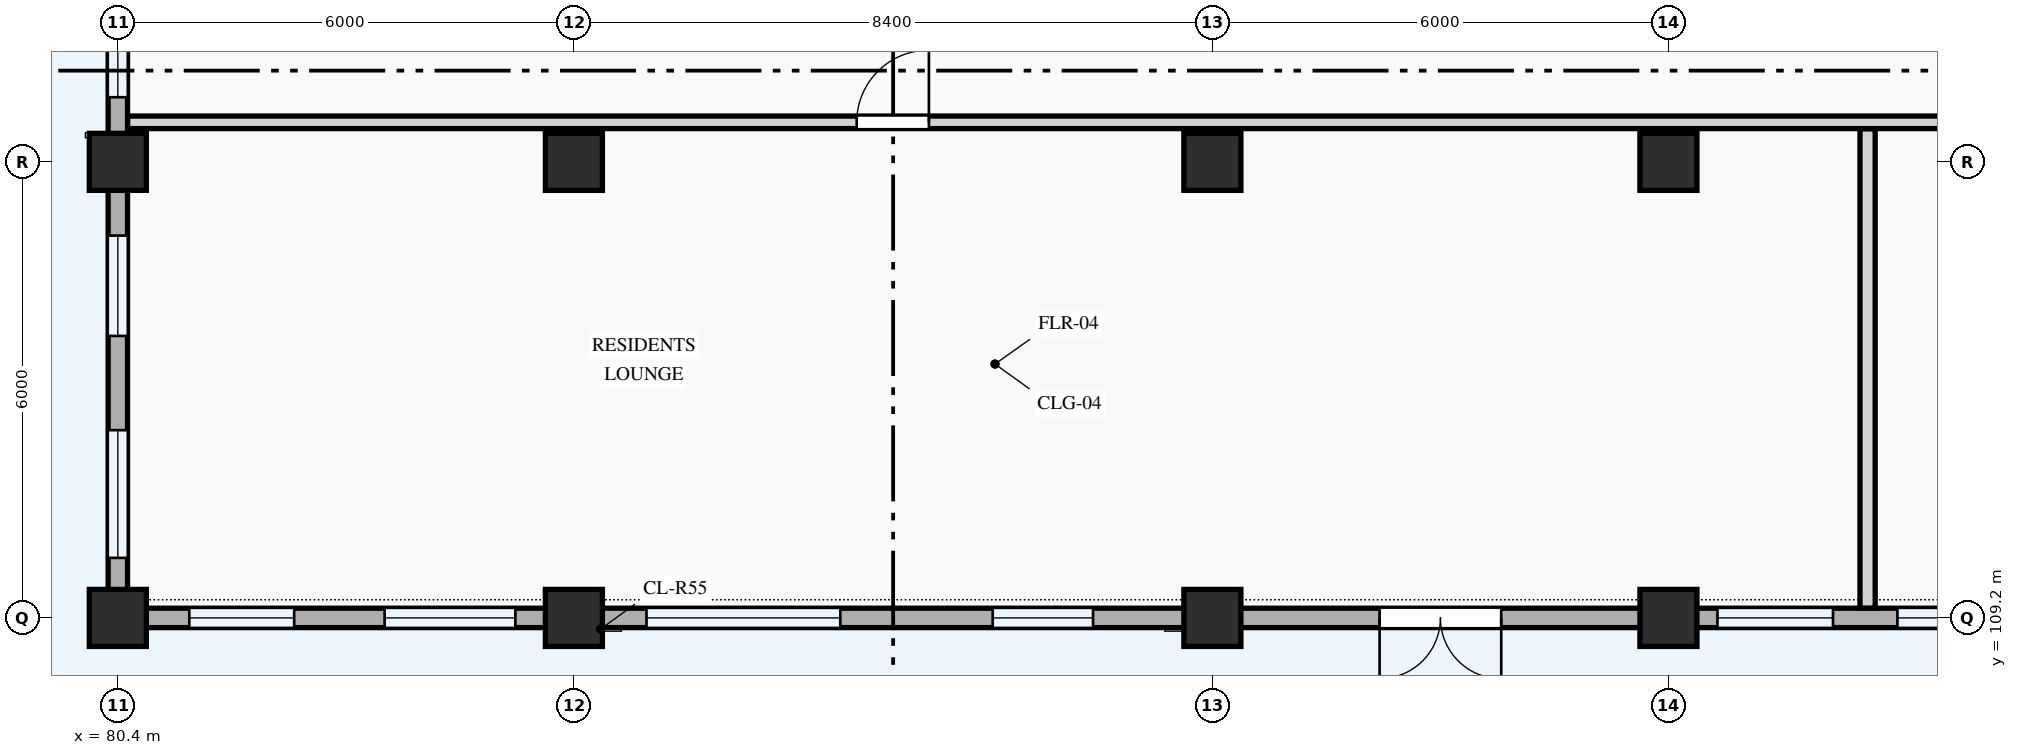
"""IFC4 building model, lengths in metres.
Left out: names, types, materials, properties, quantities, classifications, styles, units other than length and angle.
Written with IfcOpenShell. Run it as: python <this file> out.ifc"""

import sys

from ifc_helpers import new_model, si_unit, direction, frame, frame_2d, origin, origin_2d, place, context, subcontext, project, spatial, rectangle, extrude, element, fill, save


model = new_model("IFC4")
c1 = context("Model", 3, precision=1e-05, world=origin(), true_north=direction((0.0, 1.0)))
c2 = subcontext(c1, "Body", "Model", "MODEL_VIEW")
j1 = project(units=[si_unit("LENGTHUNIT", "METRE"), si_unit("PLANEANGLEUNIT", "RADIAN")], contexts=[c1])
p1 = place(None, origin())
s1 = spatial("IfcSite", under=j1, at=p1, CompositionType="ELEMENT")
p2 = place(p1, origin())
s2 = spatial("IfcBuilding", under=s1, at=p2, CompositionType="ELEMENT")
p3 = place(p2, origin())
s3 = spatial("IfcBuildingStorey", under=s2, at=p3, CompositionType="ELEMENT", Elevation=0.0)
for number, where, z_axis, x_axis in (
    (1, (80.4, 109.2, 0.0), (0.0, 0.0, 1.0), (1.0, 0.0, 0.0)),
    (2, (80.4, 115.2, 0.0), (0.0, 0.0, 1.0), (1.0, 0.0, 0.0)),
    (3, (86.4, 109.2, 0.0), (0.0, 0.0, 1.0), (1.0, 0.0, 0.0)),
    (4, (86.4, 115.2, 0.0), (0.0, 0.0, 1.0), (1.0, 0.0, 0.0)),
    (5, (94.8, 109.2, 0.0), (0.0, 0.0, 1.0), (1.0, 0.0, 0.0)),
    (6, (94.8, 115.2, 0.0), (0.0, 0.0, 1.0), (1.0, 0.0, 0.0)),
    (7, (100.8, 109.2, 0.0), (0.0, 0.0, 1.0), (1.0, 0.0, 0.0)),
    (8, (100.8, 115.2, 0.0), (0.0, 0.0, 1.0), (1.0, 0.0, 0.0)),
):
    element("IfcColumn", number, at=place(p3, frame(where, z_axis=z_axis, x_axis=x_axis)), inside=s3, PredefinedType="COLUMN", context=c2, shape_type="SweptSolid", body=[
        extrude(rectangle(XDim=0.75, YDim=0.75, at=origin_2d()), origin(), (0.0, 0.0, 1.0), 4.5),
    ])
p4 = place(p3, frame((80.4, 123.6, 0.0), z_axis=(0.0, 0.0, 1.0), x_axis=(0.0, -1.0, 0.0)))
e9 = element("IfcWall", 9, at=p4, inside=s3, PredefinedType="STANDARD", context=c2, shape_type="SweptSolid", body=[
    extrude(rectangle(XDim=8.4, YDim=0.255, at=frame_2d((4.2, 0.0))), origin(), (0.0, 0.0, 1.0), 3.485),
])
p5 = place(p4, frame((1.008, 0.0, 0.78)))
e10 = element("IfcOpeningElement", 10, at=p5, cuts=e9, PredefinedType="OPENING", context=c2, shape_type="SweptSolid", body=[
    extrude(rectangle(XDim=1.35, YDim=1.55, at=frame_2d((0.675, 0.775))), frame((0.0, 0.137, 0.0), z_axis=(0.0, -1.0, 0.0), x_axis=(1.0, 0.0, 0.0)), (0.0, 0.0, 1.0), 0.275),
])
p6 = place(p4, frame((3.728, 0.0, 0.78)))
e11 = element("IfcOpeningElement", 11, at=p6, cuts=e9, PredefinedType="OPENING", context=c2, shape_type="SweptSolid", body=[
    extrude(rectangle(XDim=1.6, YDim=1.75, at=frame_2d((0.8, 0.875))), frame((0.0, 0.137, 0.0), z_axis=(0.0, -1.0, 0.0), x_axis=(1.0, 0.0, 0.0)), (0.0, 0.0, 1.0), 0.275),
])
p7 = place(p4, frame((6.35, 0.0, 0.78)))
e12 = element("IfcOpeningElement", 12, at=p7, cuts=e9, PredefinedType="OPENING", context=c2, shape_type="SweptSolid", body=[
    extrude(rectangle(XDim=1.2, YDim=1.5, at=frame_2d((0.6, 0.75))), frame((0.0, 0.137, 0.0), z_axis=(0.0, -1.0, 0.0), x_axis=(1.0, 0.0, 0.0)), (0.0, 0.0, 1.0), 0.275),
])
p8 = place(p3, frame((80.4, 115.2, 0.0), z_axis=(0.0, 0.0, 1.0), x_axis=(0.0, -1.0, 0.0)))
e13 = element("IfcWall", 13, at=p8, inside=s3, PredefinedType="STANDARD", context=c2, shape_type="SweptSolid", body=[
    extrude(rectangle(XDim=6.0, YDim=0.255, at=frame_2d((3.0, 0.0))), origin(), (0.0, 0.0, 1.0), 3.585),
])
p9 = place(p8, frame((0.97, 0.0, 0.78)))
e14 = element("IfcOpeningElement", 14, at=p9, cuts=e13, PredefinedType="OPENING", context=c2, shape_type="SweptSolid", body=[
    extrude(rectangle(XDim=1.32, YDim=1.35, at=frame_2d((0.66, 0.675))), frame((0.0, 0.137, 0.0), z_axis=(0.0, -1.0, 0.0), x_axis=(1.0, 0.0, 0.0)), (0.0, 0.0, 1.0), 0.275),
])
p10 = place(p8, frame((3.53, 0.0, 0.78)))
e15 = element("IfcOpeningElement", 15, at=p10, cuts=e13, PredefinedType="OPENING", context=c2, shape_type="SweptSolid", body=[
    extrude(rectangle(XDim=1.68, YDim=1.46, at=frame_2d((0.84, 0.73))), frame((0.0, 0.137, 0.0), z_axis=(0.0, -1.0, 0.0), x_axis=(1.0, 0.0, 0.0)), (0.0, 0.0, 1.0), 0.275),
])
p11 = place(p3, frame((80.4, 109.2, 0.0), z_axis=(0.0, 0.0, 1.0), x_axis=(1.0, 0.0, 0.0)))
e16 = element("IfcWall", 16, at=p11, inside=s3, PredefinedType="STANDARD", context=c2, shape_type="SweptSolid", body=[
    extrude(rectangle(XDim=6.0, YDim=0.255, at=frame_2d((3.0, 0.0))), origin(), (0.0, 0.0, 1.0), 3.585),
])
p12 = place(p11, frame((0.94, 0.0, 0.78)))
e17 = element("IfcOpeningElement", 17, at=p12, cuts=e16, PredefinedType="OPENING", context=c2, shape_type="SweptSolid", body=[
    extrude(rectangle(XDim=1.38, YDim=1.48, at=frame_2d((0.69, 0.74))), frame((0.0, 0.137, 0.0), z_axis=(0.0, -1.0, 0.0), x_axis=(1.0, 0.0, 0.0)), (0.0, 0.0, 1.0), 0.275),
])
p13 = place(p11, frame((3.51, 0.0, 0.78)))
e18 = element("IfcOpeningElement", 18, at=p13, cuts=e16, PredefinedType="OPENING", context=c2, shape_type="SweptSolid", body=[
    extrude(rectangle(XDim=1.72, YDim=1.52, at=frame_2d((0.86, 0.76))), frame((0.0, 0.137, 0.0), z_axis=(0.0, -1.0, 0.0), x_axis=(1.0, 0.0, 0.0)), (0.0, 0.0, 1.0), 0.275),
])
p14 = place(p3, frame((86.4, 109.2, 0.0), z_axis=(0.0, 0.0, 1.0), x_axis=(1.0, 0.0, 0.0)))
e19 = element("IfcWall", 19, at=p14, inside=s3, PredefinedType="STANDARD", context=c2, shape_type="SweptSolid", body=[
    extrude(rectangle(XDim=8.4, YDim=0.255, at=frame_2d((4.2, 0.0))), origin(), (0.0, 0.0, 1.0), 3.485),
])
p15 = place(p14, frame((0.955, 0.0, 0.78)))
e20 = element("IfcOpeningElement", 20, at=p15, cuts=e19, PredefinedType="OPENING", context=c2, shape_type="SweptSolid", body=[
    extrude(rectangle(XDim=2.55, YDim=1.8, at=frame_2d((1.275, 0.9))), frame((0.0, 0.137, 0.0), z_axis=(0.0, -1.0, 0.0), x_axis=(1.0, 0.0, 0.0)), (0.0, 0.0, 1.0), 0.275),
])
p16 = place(p14, frame((5.51, 0.0, 0.78)))
e21 = element("IfcOpeningElement", 21, at=p16, cuts=e19, PredefinedType="OPENING", context=c2, shape_type="SweptSolid", body=[
    extrude(rectangle(XDim=1.32, YDim=1.35, at=frame_2d((0.66, 0.675))), frame((0.0, 0.137, 0.0), z_axis=(0.0, -1.0, 0.0), x_axis=(1.0, 0.0, 0.0)), (0.0, 0.0, 1.0), 0.275),
])
p17 = place(p3, frame((94.8, 109.2, 0.0), z_axis=(0.0, 0.0, 1.0), x_axis=(1.0, 0.0, 0.0)))
e22 = element("IfcWall", 22, at=p17, inside=s3, PredefinedType="STANDARD", context=c2, shape_type="SweptSolid", body=[
    extrude(rectangle(XDim=6.0, YDim=0.255, at=frame_2d((3.0, 0.0))), origin(), (0.0, 0.0, 1.0), 3.585),
])
p18 = place(p17, frame((2.2, 0.0, 0.0)))
e23 = element("IfcOpeningElement", 23, at=p18, cuts=e22, PredefinedType="OPENING", context=c2, shape_type="SweptSolid", body=[
    extrude(rectangle(XDim=1.6, YDim=2.35, at=frame_2d((0.8, 1.175))), frame((0.0, 0.137, 0.0), z_axis=(0.0, -1.0, 0.0), x_axis=(1.0, 0.0, 0.0)), (0.0, 0.0, 1.0), 0.275),
])
p19 = place(p3, frame((100.8, 109.2, 0.0), z_axis=(0.0, 0.0, 1.0), x_axis=(1.0, 0.0, 0.0)))
e24 = element("IfcWall", 24, at=p19, inside=s3, PredefinedType="STANDARD", context=c2, shape_type="SweptSolid", body=[
    extrude(rectangle(XDim=8.4, YDim=0.255, at=frame_2d((4.2, 0.0))), origin(), (0.0, 0.0, 1.0), 3.485),
])
p20 = place(p19, frame((0.645, 0.0, 0.78)))
e25 = element("IfcOpeningElement", 25, at=p20, cuts=e24, PredefinedType="OPENING", context=c2, shape_type="SweptSolid", body=[
    extrude(rectangle(XDim=1.52, YDim=1.42, at=frame_2d((0.76, 0.71))), frame((0.0, 0.137, 0.0), z_axis=(0.0, -1.0, 0.0), x_axis=(1.0, 0.0, 0.0)), (0.0, 0.0, 1.0), 0.275),
])
p21 = place(p19, frame((3.012, 0.0, 0.78)))
e26 = element("IfcOpeningElement", 26, at=p21, cuts=e24, PredefinedType="OPENING", context=c2, shape_type="SweptSolid", body=[
    extrude(rectangle(XDim=2.08, YDim=1.52, at=frame_2d((1.04, 0.76))), frame((0.0, 0.137, 0.0), z_axis=(0.0, -1.0, 0.0), x_axis=(1.0, 0.0, 0.0)), (0.0, 0.0, 1.0), 0.275),
])
p22 = place(p19, frame((6.228, 0.0, 0.78)))
e27 = element("IfcOpeningElement", 27, at=p22, cuts=e24, PredefinedType="OPENING", context=c2, shape_type="SweptSolid", body=[
    extrude(rectangle(XDim=1.1, YDim=1.3, at=frame_2d((0.55, 0.65))), frame((0.0, 0.137, 0.0), z_axis=(0.0, -1.0, 0.0), x_axis=(1.0, 0.0, 0.0)), (0.0, 0.0, 1.0), 0.275),
])
p23 = place(p3, frame((103.42, 109.33, 0.0), z_axis=(0.0, 0.0, 1.0), x_axis=(0.0, 1.0, 0.0)))
e28 = element("IfcWall", 28, at=p23, inside=s3, PredefinedType="PARTITIONING", context=c2, shape_type="SweptSolid", body=[
    extrude(rectangle(XDim=6.306, YDim=0.2, at=frame_2d((3.153, 0.0))), origin(), (0.0, 0.0, 1.0), 4.2),
])
p24 = place(p3, frame((80.53, 115.72, 0.0), z_axis=(0.0, 0.0, 1.0), x_axis=(1.0, 0.0, 0.0)))
e29 = element("IfcWall", 29, at=p24, inside=s3, PredefinedType="PARTITIONING", context=c2, shape_type="SweptSolid", body=[
    extrude(rectangle(XDim=69.521, YDim=0.165, at=frame_2d((34.76, 0.0))), origin(), (0.0, 0.0, 1.0), 4.2),
])
p25 = place(p24, frame((9.591, 0.0, 0.0)))
e30 = element("IfcOpeningElement", 30, at=p25, cuts=e29, PredefinedType="OPENING", context=c2, shape_type="SweptSolid", body=[
    extrude(rectangle(XDim=0.95, YDim=2.1, at=frame_2d((0.475, 1.05))), frame((0.0, 0.093, 0.0), z_axis=(0.0, -1.0, 0.0), x_axis=(1.0, 0.0, 0.0)), (0.0, 0.0, 1.0), 0.185),
])
p26 = place(p24, frame((38.417, 0.0, 0.0)))
e31 = element("IfcOpeningElement", 31, at=p26, cuts=e29, PredefinedType="OPENING", context=c2, shape_type="SweptSolid", body=[
    extrude(rectangle(XDim=0.95, YDim=2.1, at=frame_2d((0.475, 1.05))), frame((0.0, 0.093, 0.0), z_axis=(0.0, -1.0, 0.0), x_axis=(1.0, 0.0, 0.0)), (0.0, 0.0, 1.0), 0.185),
])
p27 = place(p24, frame((52.86, 0.0, 0.0)))
e32 = element("IfcOpeningElement", 32, at=p27, cuts=e29, PredefinedType="OPENING", context=c2, shape_type="SweptSolid", body=[
    extrude(rectangle(XDim=0.95, YDim=2.1, at=frame_2d((0.475, 1.05))), frame((0.0, 0.093, 0.0), z_axis=(0.0, -1.0, 0.0), x_axis=(1.0, 0.0, 0.0)), (0.0, 0.0, 1.0), 0.185),
])
p28 = place(p7, origin())
e33 = element("IfcWindow", 33, at=p28, inside=s3, PartitioningType="SINGLE_PANEL", PredefinedType="WINDOW", context=c2, shape_type="SweptSolid", body=[
    extrude(rectangle(XDim=1.2, YDim=1.5, at=frame_2d((0.6, 0.75))), frame((0.0, 0.03, 0.0), z_axis=(0.0, -1.0, 0.0), x_axis=(1.0, 0.0, 0.0)), (0.0, 0.0, 1.0), 0.06),
])
fill(e12, e33)
p29 = place(p9, origin())
e34 = element("IfcWindow", 34, at=p29, inside=s3, PartitioningType="SINGLE_PANEL", PredefinedType="WINDOW", context=c2, shape_type="SweptSolid", body=[
    extrude(rectangle(XDim=1.32, YDim=1.35, at=frame_2d((0.66, 0.675))), frame((0.0, 0.03, 0.0), z_axis=(0.0, -1.0, 0.0), x_axis=(1.0, 0.0, 0.0)), (0.0, 0.0, 1.0), 0.06),
])
fill(e14, e34)
p30 = place(p10, origin())
e35 = element("IfcWindow", 35, at=p30, inside=s3, PartitioningType="DOUBLE_PANEL_VERTICAL", PredefinedType="WINDOW", context=c2, shape_type="SweptSolid", body=[
    extrude(rectangle(XDim=1.68, YDim=1.46, at=frame_2d((0.84, 0.73))), frame((0.0, 0.03, 0.0), z_axis=(0.0, -1.0, 0.0), x_axis=(1.0, 0.0, 0.0)), (0.0, 0.0, 1.0), 0.06),
])
fill(e15, e35)
p31 = place(p12, origin())
e36 = element("IfcWindow", 36, at=p31, inside=s3, PartitioningType="SINGLE_PANEL", PredefinedType="WINDOW", context=c2, shape_type="SweptSolid", body=[
    extrude(rectangle(XDim=1.38, YDim=1.48, at=frame_2d((0.69, 0.74))), frame((0.0, 0.03, 0.0), z_axis=(0.0, -1.0, 0.0), x_axis=(1.0, 0.0, 0.0)), (0.0, 0.0, 1.0), 0.06),
])
fill(e17, e36)
p32 = place(p13, origin())
e37 = element("IfcWindow", 37, at=p32, inside=s3, PartitioningType="DOUBLE_PANEL_VERTICAL", PredefinedType="WINDOW", context=c2, shape_type="SweptSolid", body=[
    extrude(rectangle(XDim=1.72, YDim=1.52, at=frame_2d((0.86, 0.76))), frame((0.0, 0.03, 0.0), z_axis=(0.0, -1.0, 0.0), x_axis=(1.0, 0.0, 0.0)), (0.0, 0.0, 1.0), 0.06),
])
fill(e18, e37)
p33 = place(p15, origin())
e38 = element("IfcWindow", 38, at=p33, inside=s3, PartitioningType="DOUBLE_PANEL_VERTICAL", PredefinedType="WINDOW", context=c2, shape_type="SweptSolid", body=[
    extrude(rectangle(XDim=2.55, YDim=1.8, at=frame_2d((1.275, 0.9))), frame((0.0, 0.03, 0.0), z_axis=(0.0, -1.0, 0.0), x_axis=(1.0, 0.0, 0.0)), (0.0, 0.0, 1.0), 0.06),
])
fill(e20, e38)
p34 = place(p16, origin())
e39 = element("IfcWindow", 39, at=p34, inside=s3, PartitioningType="SINGLE_PANEL", PredefinedType="WINDOW", context=c2, shape_type="SweptSolid", body=[
    extrude(rectangle(XDim=1.32, YDim=1.35, at=frame_2d((0.66, 0.675))), frame((0.0, 0.03, 0.0), z_axis=(0.0, -1.0, 0.0), x_axis=(1.0, 0.0, 0.0)), (0.0, 0.0, 1.0), 0.06),
])
fill(e21, e39)
p35 = place(p18, frame((1.6, 0.0, 0.0), z_axis=(0.0, 0.0, 1.0), x_axis=(-1.0, 0.0, 0.0)))
e40 = element("IfcDoor", 40, at=p35, inside=s3, OperationType="DOUBLE_DOOR_SINGLE_SWING", PredefinedType="DOOR", context=c2, shape_type="SweptSolid", body=[
    extrude(rectangle(XDim=1.6, YDim=2.35, at=frame_2d((0.8, 1.175))), frame((0.0, 0.025, 0.0), z_axis=(0.0, -1.0, 0.0), x_axis=(1.0, 0.0, 0.0)), (0.0, 0.0, 1.0), 0.05),
])
fill(e23, e40)
p36 = place(p20, origin())
e41 = element("IfcWindow", 41, at=p36, inside=s3, PartitioningType="SINGLE_PANEL", PredefinedType="WINDOW", context=c2, shape_type="SweptSolid", body=[
    extrude(rectangle(XDim=1.52, YDim=1.42, at=frame_2d((0.76, 0.71))), frame((0.0, 0.03, 0.0), z_axis=(0.0, -1.0, 0.0), x_axis=(1.0, 0.0, 0.0)), (0.0, 0.0, 1.0), 0.06),
])
fill(e25, e41)
p37 = place(p21, origin())
e42 = element("IfcWindow", 42, at=p37, inside=s3, PartitioningType="DOUBLE_PANEL_VERTICAL", PredefinedType="WINDOW", context=c2, shape_type="SweptSolid", body=[
    extrude(rectangle(XDim=2.08, YDim=1.52, at=frame_2d((1.04, 0.76))), frame((0.0, 0.03, 0.0), z_axis=(0.0, -1.0, 0.0), x_axis=(1.0, 0.0, 0.0)), (0.0, 0.0, 1.0), 0.06),
])
fill(e26, e42)
p38 = place(p25, origin())
e43 = element("IfcDoor", 43, at=p38, inside=s3, OperationType="SINGLE_SWING_RIGHT", PredefinedType="DOOR", context=c2, shape_type="SweptSolid", body=[
    extrude(rectangle(XDim=0.95, YDim=2.1, at=frame_2d((0.475, 1.05))), frame((0.0, 0.025, 0.0), z_axis=(0.0, -1.0, 0.0), x_axis=(1.0, 0.0, 0.0)), (0.0, 0.0, 1.0), 0.05),
])
fill(e30, e43)
save(model, sys.argv[1])
